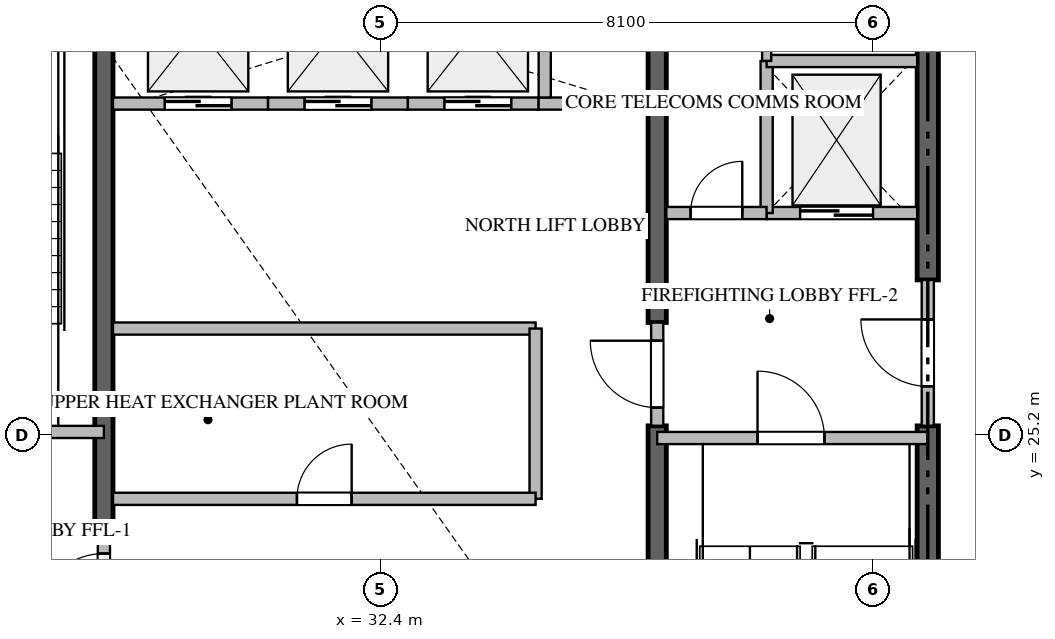
"""IFC4 building model, lengths in metres.
Left out: names, types, materials, properties, quantities, classifications, styles, units other than length and angle.
Written with IfcOpenShell. Run it as: python <this file> out.ifc"""

import sys

from ifc_helpers import new_model, si_unit, direction, frame, frame_2d, origin, place, context, subcontext, project, spatial, rectangle, extrude, source, transform, mapped, element, fill, save


model = new_model("IFC4")
c1 = context("Model", 3, precision=1e-05, world=origin(), true_north=direction((0.0, 1.0)))
c2 = subcontext(c1, "Body", "Model", "MODEL_VIEW")
j1 = project(units=[si_unit("LENGTHUNIT", "METRE"), si_unit("PLANEANGLEUNIT", "RADIAN")], contexts=[c1])
p1 = place(None, origin())
s1 = spatial("IfcSite", under=j1, at=p1, CompositionType="ELEMENT")
p2 = place(p1, origin())
s2 = spatial("IfcBuilding", under=s1, at=p2, CompositionType="ELEMENT")
p3 = place(p2, frame((0.0, 0.0, 248.95)))
s3 = spatial("IfcBuildingStorey", under=s2, at=p3, CompositionType="ELEMENT", Elevation=248.95)
p4 = place(p3, frame((41.4, 16.975, -0.26), z_axis=(0.0, 0.0, 1.0), x_axis=(0.0, 1.0, 0.0)))
e1 = element("IfcWall", 1, at=p4, inside=s3, PredefinedType="SHEAR", context=c2, shape_type="SweptSolid", body=[
    extrude(rectangle(XDim=8.375, YDim=0.35, at=frame_2d((4.188, 0.0))), origin(), (0.0, 0.0, 1.0), 3.848),
])
p5 = place(p3, frame((41.4, 27.75, -0.26), z_axis=(0.0, 0.0, 1.0), x_axis=(0.0, 1.0, 0.0)))
e2 = element("IfcWall", 2, at=p5, inside=s3, PredefinedType="SHEAR", context=c2, shape_type="SweptSolid", body=[
    extrude(rectangle(XDim=5.675, YDim=0.35, at=frame_2d((2.837, 0.0))), origin(), (0.0, 0.0, 1.0), 3.848),
])
p6 = place(p3, frame((27.85, 23.55, -0.26), z_axis=(0.0, 0.0, 1.0), x_axis=(0.0, 1.0, 0.0)))
e3 = element("IfcWall", 3, at=p6, inside=s3, PredefinedType="SHEAR", context=c2, shape_type="SweptSolid", body=[
    extrude(rectangle(XDim=9.875, YDim=0.3, at=frame_2d((4.938, 0.0))), origin(), (0.0, 0.0, 1.0), 3.848),
])
p7 = place(p3, frame((36.95, 16.975, -0.26), z_axis=(0.0, 0.0, 1.0), x_axis=(0.0, 1.0, 0.0)))
e4 = element("IfcWall", 4, at=p7, inside=s3, PredefinedType="SHEAR", context=c2, shape_type="SweptSolid", body=[
    extrude(rectangle(XDim=8.375, YDim=0.3, at=frame_2d((4.188, 0.0))), origin(), (0.0, 0.0, 1.0), 3.848),
])
p8 = place(p3, frame((36.95, 27.05, -0.26), z_axis=(0.0, 0.0, 1.0), x_axis=(0.0, 1.0, 0.0)))
e5 = element("IfcWall", 5, at=p8, inside=s3, PredefinedType="SHEAR", context=c2, shape_type="SweptSolid", body=[
    extrude(rectangle(XDim=6.375, YDim=0.3, at=frame_2d((3.188, 0.0))), origin(), (0.0, 0.0, 1.0), 3.848),
])
p9 = place(p3, frame((23.4, 25.25, 0.0), z_axis=(0.0, 0.0, 1.0), x_axis=(1.0, 0.0, 0.0)))
e6 = element("IfcWall", 6, at=p9, inside=s3, PredefinedType="STANDARD", context=c2, shape_type="SweptSolid", body=[
    extrude(rectangle(XDim=4.45, YDim=0.2, at=frame_2d((2.225, 0.0))), origin(), (0.0, 0.0, 1.0), 3.59),
])
p10 = place(p9, frame((1.65, 0.0, 0.0)))
e7 = element("IfcOpeningElement", 7, at=p10, cuts=e6, PredefinedType="OPENING", context=c2, shape_type="SweptSolid", body=[
    extrude(rectangle(XDim=1.1, YDim=2.15, at=frame_2d((0.55, 1.075))), frame((0.0, 0.11, 0.0), z_axis=(0.0, -1.0, 0.0), x_axis=(1.0, 0.0, 0.0)), (0.0, 0.0, 1.0), 0.22),
])
p11 = place(p3, frame((36.95, 25.15, 0.0), z_axis=(0.0, 0.0, 1.0), x_axis=(1.0, 0.0, 0.0)))
e8 = element("IfcWall", 8, at=p11, inside=s3, PredefinedType="STANDARD", context=c2, shape_type="SweptSolid", body=[
    extrude(rectangle(XDim=4.45, YDim=0.2, at=frame_2d((2.225, 0.0))), origin(), (0.0, 0.0, 1.0), 3.59),
])
p12 = place(p11, frame((1.65, 0.0, 0.0)))
e9 = element("IfcOpeningElement", 9, at=p12, cuts=e8, PredefinedType="OPENING", context=c2, shape_type="SweptSolid", body=[
    extrude(rectangle(XDim=1.1, YDim=2.15, at=frame_2d((0.55, 1.075))), frame((0.0, 0.11, 0.0), z_axis=(0.0, -1.0, 0.0), x_axis=(1.0, 0.0, 0.0)), (0.0, 0.0, 1.0), 0.22),
])
p13 = place(p3, frame((38.75, 28.85, 0.0), z_axis=(0.0, 0.0, 1.0), x_axis=(1.0, 0.0, 0.0)))
e10 = element("IfcWall", 10, at=p13, inside=s3, PredefinedType="STANDARD", context=c2, shape_type="SweptSolid", body=[
    extrude(rectangle(XDim=2.475, YDim=0.2, at=frame_2d((1.238, 0.0))), origin(), (0.0, 0.0, 1.0), 3.59),
])
p14 = place(p13, frame((0.55, 0.0, 0.0)))
e11 = element("IfcOpeningElement", 11, at=p14, cuts=e10, PredefinedType="OPENING", context=c2, shape_type="SweptSolid", body=[
    extrude(rectangle(XDim=1.2, YDim=2.2, at=frame_2d((0.6, 1.1))), frame((0.0, 0.11, 0.0), z_axis=(0.0, -1.0, 0.0), x_axis=(1.0, 0.0, 0.0)), (0.0, 0.0, 1.0), 0.22),
])
p15 = place(p3, frame((28.0, 30.65, 0.0), z_axis=(0.0, 0.0, 1.0), x_axis=(1.0, 0.0, 0.0)))
e12 = element("IfcWall", 12, at=p15, inside=s3, PredefinedType="STANDARD", context=c2, shape_type="SweptSolid", body=[
    extrude(rectangle(XDim=2.55, YDim=0.2, at=frame_2d((1.275, 0.0))), origin(), (0.0, 0.0, 1.0), 3.59),
])
p16 = place(p15, frame((0.85, 0.0, 0.0)))
e13 = element("IfcOpeningElement", 13, at=p16, cuts=e12, PredefinedType="OPENING", context=c2, shape_type="SweptSolid", body=[
    extrude(rectangle(XDim=1.1, YDim=2.2, at=frame_2d((0.55, 1.1))), frame((0.0, 0.11, 0.0), z_axis=(0.0, -1.0, 0.0), x_axis=(1.0, 0.0, 0.0)), (0.0, 0.0, 1.0), 0.22),
])
p17 = place(p3, frame((30.55, 30.65, 0.0), z_axis=(0.0, 0.0, 1.0), x_axis=(1.0, 0.0, 0.0)))
e14 = element("IfcWall", 14, at=p17, inside=s3, PredefinedType="STANDARD", context=c2, shape_type="SweptSolid", body=[
    extrude(rectangle(XDim=2.3, YDim=0.2, at=frame_2d((1.15, 0.0))), origin(), (0.0, 0.0, 1.0), 3.59),
])
p18 = place(p17, frame((0.6, 0.0, 0.0)))
e15 = element("IfcOpeningElement", 15, at=p18, cuts=e14, PredefinedType="OPENING", context=c2, shape_type="SweptSolid", body=[
    extrude(rectangle(XDim=1.1, YDim=2.2, at=frame_2d((0.55, 1.1))), frame((0.0, 0.11, 0.0), z_axis=(0.0, -1.0, 0.0), x_axis=(1.0, 0.0, 0.0)), (0.0, 0.0, 1.0), 0.22),
])
p19 = place(p3, frame((32.85, 30.65, 0.0), z_axis=(0.0, 0.0, 1.0), x_axis=(1.0, 0.0, 0.0)))
e16 = element("IfcWall", 16, at=p19, inside=s3, PredefinedType="STANDARD", context=c2, shape_type="SweptSolid", body=[
    extrude(rectangle(XDim=2.15, YDim=0.2, at=frame_2d((1.075, 0.0))), origin(), (0.0, 0.0, 1.0), 3.59),
])
p20 = place(p19, frame((0.6, 0.0, 0.0)))
e17 = element("IfcOpeningElement", 17, at=p20, cuts=e16, PredefinedType="OPENING", context=c2, shape_type="SweptSolid", body=[
    extrude(rectangle(XDim=1.1, YDim=2.2, at=frame_2d((0.55, 1.1))), frame((0.0, 0.11, 0.0), z_axis=(0.0, -1.0, 0.0), x_axis=(1.0, 0.0, 0.0)), (0.0, 0.0, 1.0), 0.22),
])
p21 = place(p3, frame((35.0, 30.65, 0.0), z_axis=(0.0, 0.0, 1.0), x_axis=(1.0, 0.0, 0.0)))
e18 = element("IfcWall", 18, at=p21, inside=s3, PredefinedType="STANDARD", context=c2, shape_type="SweptSolid", body=[
    extrude(rectangle(XDim=1.8, YDim=0.2, at=frame_2d((0.9, 0.0))), origin(), (0.0, 0.0, 1.0), 3.59),
])
p22 = place(p3, frame((35.1, 30.75, 0.0), z_axis=(0.0, 0.0, 1.0), x_axis=(0.0, 1.0, 0.0)))
e19 = element("IfcWall", 19, at=p22, inside=s3, PredefinedType="STANDARD", context=c2, shape_type="SweptSolid", body=[
    extrude(rectangle(XDim=2.675, YDim=0.2, at=frame_2d((1.337, 0.0))), origin(), (0.0, 0.0, 1.0), 3.59),
])
p23 = place(p3, frame((38.75, 28.85, 0.0), z_axis=(0.0, 0.0, 1.0), x_axis=(0.0, 1.0, 0.0)))
e20 = element("IfcWall", 20, at=p23, inside=s3, PredefinedType="STANDARD", context=c2, shape_type="SweptSolid", body=[
    extrude(rectangle(XDim=2.5, YDim=0.2, at=frame_2d((1.25, 0.0))), origin(), (0.0, 0.0, 1.0), 3.59),
])
p24 = place(p3, frame((38.75, 31.35, 0.0), z_axis=(0.0, 0.0, 1.0), x_axis=(1.0, 0.0, 0.0)))
e21 = element("IfcWall", 21, at=p24, inside=s3, PredefinedType="STANDARD", context=c2, shape_type="SweptSolid", body=[
    extrude(rectangle(XDim=2.475, YDim=0.2, at=frame_2d((1.238, 0.0))), origin(), (0.0, 0.0, 1.0), 3.59),
])
p25 = place(p3, frame((37.1, 28.85, 0.0), z_axis=(0.0, 0.0, 1.0), x_axis=(1.0, 0.0, 0.0)))
e22 = element("IfcWall", 22, at=p25, inside=s3, PredefinedType="STANDARD", context=c2, shape_type="SweptSolid", body=[
    extrude(rectangle(XDim=1.648, YDim=0.2, at=frame_2d((0.824, 0.0))), origin(), (0.0, 0.0, 1.0), 3.59),
])
p26 = place(p25, frame((0.399, 0.0, 0.0)))
e23 = element("IfcOpeningElement", 23, at=p26, cuts=e22, PredefinedType="OPENING", context=c2, shape_type="SweptSolid", body=[
    extrude(rectangle(XDim=0.85, YDim=2.1, at=frame_2d((0.425, 1.05))), frame((0.0, 0.11, 0.0), z_axis=(0.0, -1.0, 0.0), x_axis=(1.0, 0.0, 0.0)), (0.0, 0.0, 1.0), 0.22),
])
p27 = place(p3, frame((41.4, 25.352, 0.0), z_axis=(0.0, 0.0, 1.0), x_axis=(0.0, 1.0, 0.0)))
e24 = element("IfcWall", 24, at=p27, inside=s3, PredefinedType="STANDARD", context=c2, shape_type="SweptSolid", body=[
    extrude(rectangle(XDim=2.396, YDim=0.2, at=frame_2d((1.198, 0.0))), origin(), (0.0, 0.0, 1.0), 3.59),
])
p28 = place(p27, frame((0.648, 0.0, 0.0)))
e25 = element("IfcOpeningElement", 25, at=p28, cuts=e24, PredefinedType="OPENING", context=c2, shape_type="SweptSolid", body=[
    extrude(rectangle(XDim=1.1, YDim=2.15, at=frame_2d((0.55, 1.075))), frame((0.0, 0.11, 0.0), z_axis=(0.0, -1.0, 0.0), x_axis=(1.0, 0.0, 0.0)), (0.0, 0.0, 1.0), 0.22),
])
p29 = place(p3, frame((27.85, 21.852, 0.0), z_axis=(0.0, 0.0, 1.0), x_axis=(0.0, 1.0, 0.0)))
e26 = element("IfcWall", 26, at=p29, inside=s3, PredefinedType="STANDARD", context=c2, shape_type="SweptSolid", body=[
    extrude(rectangle(XDim=1.696, YDim=0.2, at=frame_2d((0.848, 0.0))), origin(), (0.0, 0.0, 1.0), 3.59),
])
p30 = place(p29, frame((0.298, 0.0, 0.0)))
e27 = element("IfcOpeningElement", 27, at=p30, cuts=e26, PredefinedType="OPENING", context=c2, shape_type="SweptSolid", body=[
    extrude(rectangle(XDim=1.1, YDim=2.15, at=frame_2d((0.55, 1.075))), frame((0.0, 0.11, 0.0), z_axis=(0.0, -1.0, 0.0), x_axis=(1.0, 0.0, 0.0)), (0.0, 0.0, 1.0), 0.22),
])
p31 = place(p3, frame((36.95, 25.352, 0.0), z_axis=(0.0, 0.0, 1.0), x_axis=(0.0, 1.0, 0.0)))
e28 = element("IfcWall", 28, at=p31, inside=s3, PredefinedType="STANDARD", context=c2, shape_type="SweptSolid", body=[
    extrude(rectangle(XDim=1.696, YDim=0.2, at=frame_2d((0.848, 0.0))), origin(), (0.0, 0.0, 1.0), 3.59),
])
p32 = place(p31, frame((0.298, 0.0, 0.0)))
e29 = element("IfcOpeningElement", 29, at=p32, cuts=e28, PredefinedType="OPENING", context=c2, shape_type="SweptSolid", body=[
    extrude(rectangle(XDim=1.1, YDim=2.15, at=frame_2d((0.55, 1.075))), frame((0.0, 0.11, 0.0), z_axis=(0.0, -1.0, 0.0), x_axis=(1.0, 0.0, 0.0)), (0.0, 0.0, 1.0), 0.22),
])
p33 = place(p3, frame((38.75, 31.352, 0.0), z_axis=(0.0, 0.0, 1.0), x_axis=(0.0, 1.0, 0.0)))
e30 = element("IfcWall", 30, at=p33, inside=s3, PredefinedType="PARTITIONING", context=c2, shape_type="SweptSolid", body=[
    extrude(rectangle(XDim=2.073, YDim=0.15, at=frame_2d((1.037, 0.0))), origin(), (0.0, 0.0, 1.0), 3.59),
])
p34 = place(p33, frame((0.611, 0.0, 0.0)))
e31 = element("IfcOpeningElement", 31, at=p34, cuts=e30, PredefinedType="OPENING", context=c2, shape_type="SweptSolid", body=[
    extrude(rectangle(XDim=0.85, YDim=2.1, at=frame_2d((0.425, 1.05))), frame((0.0, 0.085, 0.0), z_axis=(0.0, -1.0, 0.0), x_axis=(1.0, 0.0, 0.0)), (0.0, 0.0, 1.0), 0.17),
])
p35 = place(p3, frame((28.0, 26.95, 0.0), z_axis=(0.0, 0.0, 1.0), x_axis=(1.0, 0.0, 0.0)))
e32 = element("IfcWall", 32, at=p35, inside=s3, PredefinedType="STANDARD", context=c2, shape_type="SweptSolid", body=[
    extrude(rectangle(XDim=6.95, YDim=0.2, at=frame_2d((3.475, 0.0))), origin(), (0.0, 0.0, 1.0), 3.59),
])
p36 = place(p3, frame((34.95, 24.15, 0.0), z_axis=(0.0, 0.0, 1.0), x_axis=(0.0, 1.0, 0.0)))
e33 = element("IfcWall", 33, at=p36, inside=s3, PredefinedType="STANDARD", context=c2, shape_type="SweptSolid", body=[
    extrude(rectangle(XDim=2.8, YDim=0.2, at=frame_2d((1.4, 0.0))), origin(), (0.0, 0.0, 1.0), 3.59),
])
p37 = place(p3, frame((28.0, 24.15, 0.0), z_axis=(0.0, 0.0, 1.0), x_axis=(1.0, 0.0, 0.0)))
e34 = element("IfcWall", 34, at=p37, inside=s3, PredefinedType="STANDARD", context=c2, shape_type="SweptSolid", body=[
    extrude(rectangle(XDim=6.95, YDim=0.2, at=frame_2d((3.475, 0.0))), origin(), (0.0, 0.0, 1.0), 3.59),
])
p38 = place(p37, frame((3.025, 0.0, 0.0)))
e35 = element("IfcOpeningElement", 35, at=p38, cuts=e34, PredefinedType="OPENING", context=c2, shape_type="SweptSolid", body=[
    extrude(rectangle(XDim=0.9, YDim=2.1, at=frame_2d((0.45, 1.05))), frame((0.0, 0.11, 0.0), z_axis=(0.0, -1.0, 0.0), x_axis=(1.0, 0.0, 0.0)), (0.0, 0.0, 1.0), 0.22),
])
m1 = source(origin(), c2, "Body", "SweptSolid", [
    extrude(rectangle(XDim=1.1, YDim=2.15, at=frame_2d((0.55, 1.075))), frame((0.0, 0.025, 0.0), z_axis=(0.0, -1.0, 0.0), x_axis=(1.0, 0.0, 0.0)), (0.0, 0.0, 1.0), 0.05),
])
p39 = place(p12, origin())
e36 = element("IfcDoor", 36, at=p39, inside=s3, OperationType="SINGLE_SWING_LEFT", PredefinedType="DOOR", context=c2, shape_type="MappedRepresentation", body=[
    mapped(m1, transform((0.0, 0.0, 0.0), scale=1.0)),
])
fill(e9, e36)
m2 = source(origin(), c2, "Body", "SweptSolid", [
    extrude(rectangle(XDim=1.2, YDim=2.2, at=frame_2d((0.6, 1.1))), frame((0.0, 0.025, 0.0), z_axis=(0.0, -1.0, 0.0), x_axis=(1.0, 0.0, 0.0)), (0.0, 0.0, 1.0), 0.05),
])
p40 = place(p14, origin())
e37 = element("IfcDoor", 37, at=p40, inside=s3, OperationType="DOUBLE_DOOR_SLIDING", PredefinedType="DOOR", context=c2, shape_type="MappedRepresentation", body=[
    mapped(m2, transform((0.0, 0.0, 0.0), scale=1.0)),
])
fill(e11, e37)
m3 = source(origin(), c2, "Body", "SweptSolid", [
    extrude(rectangle(XDim=1.1, YDim=2.2, at=frame_2d((0.55, 1.1))), frame((0.0, 0.025, 0.0), z_axis=(0.0, -1.0, 0.0), x_axis=(1.0, 0.0, 0.0)), (0.0, 0.0, 1.0), 0.05),
])
p41 = place(p16, origin())
e38 = element("IfcDoor", 38, at=p41, inside=s3, OperationType="DOUBLE_DOOR_SLIDING", PredefinedType="DOOR", context=c2, shape_type="MappedRepresentation", body=[
    mapped(m3, transform((0.0, 0.0, 0.0), scale=1.0)),
])
fill(e13, e38)
p42 = place(p18, origin())
e39 = element("IfcDoor", 39, at=p42, inside=s3, OperationType="DOUBLE_DOOR_SLIDING", PredefinedType="DOOR", context=c2, shape_type="MappedRepresentation", body=[
    mapped(m3, transform((0.0, 0.0, 0.0), scale=1.0)),
])
fill(e15, e39)
p43 = place(p20, origin())
e40 = element("IfcDoor", 40, at=p43, inside=s3, OperationType="DOUBLE_DOOR_SLIDING", PredefinedType="DOOR", context=c2, shape_type="MappedRepresentation", body=[
    mapped(m3, transform((0.0, 0.0, 0.0), scale=1.0)),
])
fill(e17, e40)
m4 = source(origin(), c2, "Body", "SweptSolid", [
    extrude(rectangle(XDim=0.85, YDim=2.1, at=frame_2d((0.425, 1.05))), frame((0.0, 0.025, 0.0), z_axis=(0.0, -1.0, 0.0), x_axis=(1.0, 0.0, 0.0)), (0.0, 0.0, 1.0), 0.05),
])
p44 = place(p26, origin())
e41 = element("IfcDoor", 41, at=p44, inside=s3, OperationType="SINGLE_SWING_RIGHT", PredefinedType="DOOR", context=c2, shape_type="MappedRepresentation", body=[
    mapped(m4, transform((0.0, 0.0, 0.0), scale=1.0)),
])
fill(e23, e41)
p45 = place(p28, origin())
e42 = element("IfcDoor", 42, at=p45, inside=s3, OperationType="SINGLE_SWING_RIGHT", PredefinedType="DOOR", context=c2, shape_type="MappedRepresentation", body=[
    mapped(m1, transform((0.0, 0.0, 0.0), scale=1.0)),
])
fill(e25, e42)
p46 = place(p30, origin())
e43 = element("IfcDoor", 43, at=p46, inside=s3, OperationType="SINGLE_SWING_LEFT", PredefinedType="DOOR", context=c2, shape_type="MappedRepresentation", body=[
    mapped(m1, transform((0.0, 0.0, 0.0), scale=1.0)),
])
fill(e27, e43)
p47 = place(p32, origin())
e44 = element("IfcDoor", 44, at=p47, inside=s3, OperationType="SINGLE_SWING_RIGHT", PredefinedType="DOOR", context=c2, shape_type="MappedRepresentation", body=[
    mapped(m1, transform((0.0, 0.0, 0.0), scale=1.0)),
])
fill(e29, e44)
m5 = source(origin(), c2, "Body", "SweptSolid", [
    extrude(rectangle(XDim=0.9, YDim=2.1, at=frame_2d((0.45, 1.05))), frame((0.0, 0.025, 0.0), z_axis=(0.0, -1.0, 0.0), x_axis=(1.0, 0.0, 0.0)), (0.0, 0.0, 1.0), 0.05),
])
p48 = place(p38, origin())
e45 = element("IfcDoor", 45, at=p48, inside=s3, OperationType="SINGLE_SWING_RIGHT", PredefinedType="DOOR", context=c2, shape_type="MappedRepresentation", body=[
    mapped(m5, transform((0.0, 0.0, 0.0), scale=1.0)),
])
fill(e35, e45)
save(model, sys.argv[1])
